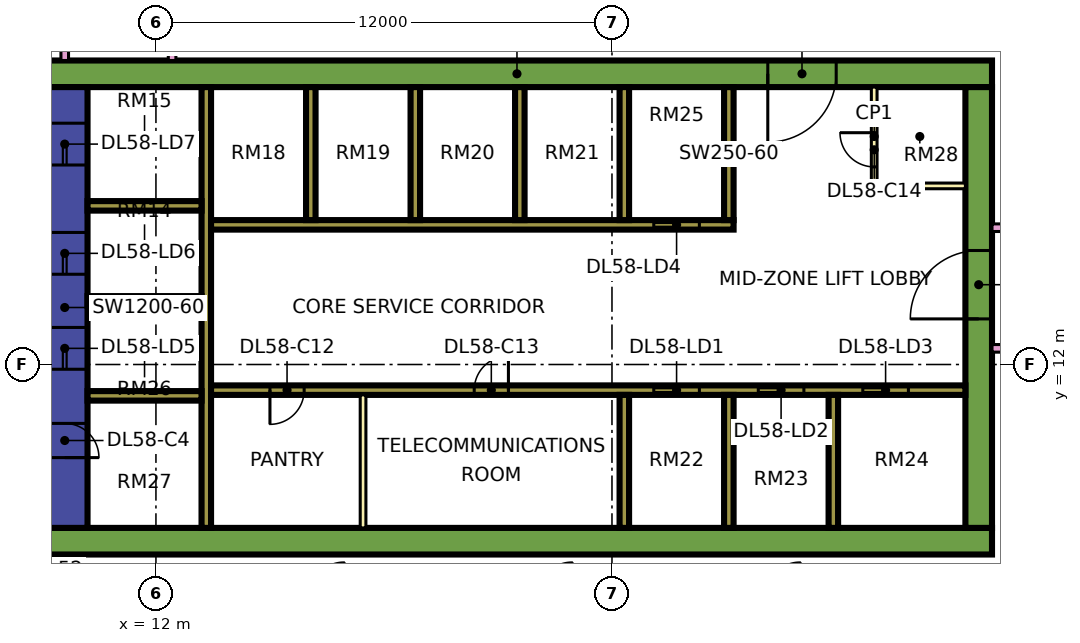
"""IFC4 building model, lengths in metres.
Left out: names, types, materials, properties, quantities, classifications, styles, units other than length and angle.
Written with IfcOpenShell. Run it as: python <this file> out.ifc"""

import sys

from ifc_helpers import new_model, si_unit, direction, frame, frame_2d, origin, place, context, subcontext, project, spatial, rectangle, extrude, element, fill, save


model = new_model("IFC4")
c1 = context("Model", 3, precision=1e-05, world=origin(), true_north=direction((0.0, 1.0)))
c2 = subcontext(c1, "Body", "Model", "MODEL_VIEW")
j1 = project(units=[si_unit("LENGTHUNIT", "METRE"), si_unit("PLANEANGLEUNIT", "RADIAN")], contexts=[c1])
p1 = place(None, origin())
s1 = spatial("IfcSite", under=j1, at=p1, CompositionType="ELEMENT")
p2 = place(p1, origin())
s2 = spatial("IfcBuilding", under=s1, at=p2, CompositionType="ELEMENT")
p3 = place(p2, frame((0.0, 0.0, 245.4)))
s3 = spatial("IfcBuildingStorey", under=s2, at=p3, CompositionType="ELEMENT", Elevation=245.4)
p4 = place(p3, frame((9.0, 7.35, 0.0), z_axis=(0.0, 0.0, 1.0), x_axis=(1.0, 0.0, 0.0)))
e1 = element("IfcWall", 1, at=p4, inside=s3, PredefinedType="SHEAR", context=c2, shape_type="SweptSolid", body=[
    extrude(rectangle(XDim=25.0, YDim=0.7, at=frame_2d((12.5, 0.0))), origin(), (0.0, 0.0, 1.0), 3.75),
])
p5 = place(p3, frame((9.0, 19.65, 0.0), z_axis=(0.0, 0.0, 1.0), x_axis=(1.0, 0.0, 0.0)))
e2 = element("IfcWall", 2, at=p5, inside=s3, PredefinedType="SHEAR", context=c2, shape_type="SweptSolid", body=[
    extrude(rectangle(XDim=25.0, YDim=0.7, at=frame_2d((12.5, 0.0))), origin(), (0.0, 0.0, 1.0), 3.75),
])
p6 = place(p5, frame((19.1, 0.0, 0.0)))
e3 = element("IfcOpeningElement", 3, at=p6, cuts=e2, PredefinedType="OPENING", context=c2, shape_type="SweptSolid", body=[
    extrude(rectangle(XDim=1.8, YDim=2.4, at=frame_2d((0.9, 1.2))), frame((0.0, 0.36, 0.0), z_axis=(0.0, -1.0, 0.0), x_axis=(1.0, 0.0, 0.0)), (0.0, 0.0, 1.0), 0.72),
])
p7 = place(p3, frame((9.6, 7.7, 0.0), z_axis=(0.0, 0.0, 1.0), x_axis=(0.0, 1.0, 0.0)))
e4 = element("IfcWall", 4, at=p7, inside=s3, PredefinedType="SHEAR", context=c2, shape_type="SweptSolid", body=[
    extrude(rectangle(XDim=11.6, YDim=1.2, at=frame_2d((5.8, 0.0))), origin(), (0.0, 0.0, 1.0), 3.75),
])
p8 = place(p7, frame((4.175, 0.0, 0.0)))
e5 = element("IfcOpeningElement", 5, at=p8, cuts=e4, PredefinedType="OPENING", context=c2, shape_type="SweptSolid", body=[
    extrude(rectangle(XDim=1.1, YDim=2.2, at=frame_2d((0.55, 1.1))), frame((0.0, 0.61, 0.0), z_axis=(0.0, -1.0, 0.0), x_axis=(1.0, 0.0, 0.0)), (0.0, 0.0, 1.0), 1.22),
])
p9 = place(p7, frame((6.675, 0.0, 0.0)))
e6 = element("IfcOpeningElement", 6, at=p9, cuts=e4, PredefinedType="OPENING", context=c2, shape_type="SweptSolid", body=[
    extrude(rectangle(XDim=1.1, YDim=2.2, at=frame_2d((0.55, 1.1))), frame((0.0, 0.61, 0.0), z_axis=(0.0, -1.0, 0.0), x_axis=(1.0, 0.0, 0.0)), (0.0, 0.0, 1.0), 1.22),
])
p10 = place(p7, frame((9.55, 0.0, 0.0)))
e7 = element("IfcOpeningElement", 7, at=p10, cuts=e4, PredefinedType="OPENING", context=c2, shape_type="SweptSolid", body=[
    extrude(rectangle(XDim=1.1, YDim=2.2, at=frame_2d((0.55, 1.1))), frame((0.0, 0.61, 0.0), z_axis=(0.0, -1.0, 0.0), x_axis=(1.0, 0.0, 0.0)), (0.0, 0.0, 1.0), 1.22),
])
p11 = place(p7, frame((1.85, 0.0, 0.0)))
e8 = element("IfcOpeningElement", 8, at=p11, cuts=e4, PredefinedType="OPENING", context=c2, shape_type="SweptSolid", body=[
    extrude(rectangle(XDim=0.9, YDim=2.1, at=frame_2d((0.45, 1.05))), frame((0.0, 0.61, 0.0), z_axis=(0.0, -1.0, 0.0), x_axis=(1.0, 0.0, 0.0)), (0.0, 0.0, 1.0), 1.22),
])
p12 = place(p3, frame((33.65, 7.7, 0.0), z_axis=(0.0, 0.0, 1.0), x_axis=(0.0, 1.0, 0.0)))
e9 = element("IfcWall", 9, at=p12, inside=s3, PredefinedType="SHEAR", context=c2, shape_type="SweptSolid", body=[
    extrude(rectangle(XDim=11.6, YDim=0.7, at=frame_2d((5.8, 0.0))), origin(), (0.0, 0.0, 1.0), 3.75),
])
p13 = place(p12, frame((5.5, 0.0, 0.0)))
e10 = element("IfcOpeningElement", 10, at=p13, cuts=e9, PredefinedType="OPENING", context=c2, shape_type="SweptSolid", body=[
    extrude(rectangle(XDim=1.8, YDim=2.4, at=frame_2d((0.9, 1.2))), frame((0.0, 0.36, 0.0), z_axis=(0.0, -1.0, 0.0), x_axis=(1.0, 0.0, 0.0)), (0.0, 0.0, 1.0), 0.72),
])
p14 = place(p3, frame((13.325, 7.7, 0.0), z_axis=(0.0, 0.0, 1.0), x_axis=(0.0, 1.0, 0.0)))
e11 = element("IfcWall", 11, at=p14, inside=s3, PredefinedType="SHEAR", context=c2, shape_type="SweptSolid", body=[
    extrude(rectangle(XDim=11.6, YDim=0.25, at=frame_2d((5.8, 0.0))), origin(), (0.0, 0.0, 1.0), 3.75),
])
p15 = place(p3, frame((13.45, 11.325, 0.0), z_axis=(0.0, 0.0, 1.0), x_axis=(1.0, 0.0, 0.0)))
e12 = element("IfcWall", 12, at=p15, inside=s3, PredefinedType="SHEAR", context=c2, shape_type="SweptSolid", body=[
    extrude(rectangle(XDim=19.85, YDim=0.25, at=frame_2d((9.925, 0.0))), origin(), (0.0, 0.0, 1.0), 3.75),
])
p16 = place(p15, frame((11.65, 0.0, 0.0)))
e13 = element("IfcOpeningElement", 13, at=p16, cuts=e12, PredefinedType="OPENING", context=c2, shape_type="SweptSolid", body=[
    extrude(rectangle(XDim=1.2, YDim=2.2, at=frame_2d((0.6, 1.1))), frame((0.0, 0.135, 0.0), z_axis=(0.0, -1.0, 0.0), x_axis=(1.0, 0.0, 0.0)), (0.0, 0.0, 1.0), 0.27),
])
p17 = place(p15, frame((14.4, 0.0, 0.0)))
e14 = element("IfcOpeningElement", 14, at=p17, cuts=e12, PredefinedType="OPENING", context=c2, shape_type="SweptSolid", body=[
    extrude(rectangle(XDim=1.2, YDim=2.2, at=frame_2d((0.6, 1.1))), frame((0.0, 0.135, 0.0), z_axis=(0.0, -1.0, 0.0), x_axis=(1.0, 0.0, 0.0)), (0.0, 0.0, 1.0), 0.27),
])
p18 = place(p15, frame((17.15, 0.0, 0.0)))
e15 = element("IfcOpeningElement", 15, at=p18, cuts=e12, PredefinedType="OPENING", context=c2, shape_type="SweptSolid", body=[
    extrude(rectangle(XDim=1.2, YDim=2.2, at=frame_2d((0.6, 1.1))), frame((0.0, 0.135, 0.0), z_axis=(0.0, -1.0, 0.0), x_axis=(1.0, 0.0, 0.0)), (0.0, 0.0, 1.0), 0.27),
])
p19 = place(p15, frame((1.55, 0.0, 0.0)))
e16 = element("IfcOpeningElement", 16, at=p19, cuts=e12, PredefinedType="OPENING", context=c2, shape_type="SweptSolid", body=[
    extrude(rectangle(XDim=0.9, YDim=2.1, at=frame_2d((0.45, 1.05))), frame((0.0, 0.135, 0.0), z_axis=(0.0, -1.0, 0.0), x_axis=(1.0, 0.0, 0.0)), (0.0, 0.0, 1.0), 0.27),
])
p20 = place(p15, frame((6.925, 0.0, 0.0)))
e17 = element("IfcOpeningElement", 17, at=p20, cuts=e12, PredefinedType="OPENING", context=c2, shape_type="SweptSolid", body=[
    extrude(rectangle(XDim=0.9, YDim=2.1, at=frame_2d((0.45, 1.05))), frame((0.0, 0.135, 0.0), z_axis=(0.0, -1.0, 0.0), x_axis=(1.0, 0.0, 0.0)), (0.0, 0.0, 1.0), 0.27),
])
p21 = place(p3, frame((13.45, 15.675, 0.0), z_axis=(0.0, 0.0, 1.0), x_axis=(1.0, 0.0, 0.0)))
e18 = element("IfcWall", 18, at=p21, inside=s3, PredefinedType="SHEAR", context=c2, shape_type="SweptSolid", body=[
    extrude(rectangle(XDim=13.75, YDim=0.25, at=frame_2d((6.875, 0.0))), origin(), (0.0, 0.0, 1.0), 3.75),
])
p22 = place(p21, frame((11.65, 0.0, 0.0)))
e19 = element("IfcOpeningElement", 19, at=p22, cuts=e18, PredefinedType="OPENING", context=c2, shape_type="SweptSolid", body=[
    extrude(rectangle(XDim=1.2, YDim=2.2, at=frame_2d((0.6, 1.1))), frame((0.0, 0.135, 0.0), z_axis=(0.0, -1.0, 0.0), x_axis=(1.0, 0.0, 0.0)), (0.0, 0.0, 1.0), 0.27),
])
for number, where, z_axis, x_axis in (
    (20, (10.2, 11.175, 0.0), (0.0, 0.0, 1.0), (1.0, 0.0, 0.0)),
    (21, (10.2, 13.675, 0.0), (0.0, 0.0, 1.0), (1.0, 0.0, 0.0)),
    (22, (10.2, 16.175, 0.0), (0.0, 0.0, 1.0), (1.0, 0.0, 0.0)),
):
    element("IfcWall", number, at=place(p3, frame(where, z_axis=z_axis, x_axis=x_axis)), inside=s3, PredefinedType="SHEAR", context=c2, shape_type="SweptSolid", body=[
        extrude(rectangle(XDim=3.0, YDim=0.25, at=frame_2d((1.5, 0.0))), origin(), (0.0, 0.0, 1.0), 3.75),
    ])
for number, where, z_axis, x_axis in (
    (23, (24.325, 7.7, 0.0), (0.0, 0.0, 1.0), (0.0, 1.0, 0.0)),
    (24, (27.075, 7.7, 0.0), (0.0, 0.0, 1.0), (0.0, 1.0, 0.0)),
    (25, (29.825, 7.7, 0.0), (0.0, 0.0, 1.0), (0.0, 1.0, 0.0)),
    (26, (16.075, 15.8, 0.0), (0.0, 0.0, 1.0), (0.0, 1.0, 0.0)),
    (27, (18.825, 15.8, 0.0), (0.0, 0.0, 1.0), (0.0, 1.0, 0.0)),
    (28, (21.575, 15.8, 0.0), (0.0, 0.0, 1.0), (0.0, 1.0, 0.0)),
    (29, (24.325, 15.8, 0.0), (0.0, 0.0, 1.0), (0.0, 1.0, 0.0)),
    (30, (27.075, 15.8, 0.0), (0.0, 0.0, 1.0), (0.0, 1.0, 0.0)),
):
    element("IfcWall", number, at=place(p3, frame(where, z_axis=z_axis, x_axis=x_axis)), inside=s3, PredefinedType="SHEAR", context=c2, shape_type="SweptSolid", body=[
        extrude(rectangle(XDim=3.5, YDim=0.25, at=frame_2d((1.75, 0.0))), origin(), (0.0, 0.0, 1.0), 3.75),
    ])
p23 = place(p3, frame((-1.447, 12.553, 0.0), z_axis=(0.0, 0.0, 1.0), x_axis=(0.707106781187, -0.707106781187, 0.0)))
e31 = element("IfcWall", 31, at=p23, inside=s3, PredefinedType="SOLIDWALL", context=c2, shape_type="SweptSolid", body=[
    extrude(rectangle(XDim=19.799, YDim=0.15, at=frame_2d((9.899, 0.0))), origin(), (0.0, 0.0, 1.0), 3.35),
])
p24 = place(p23, frame((2.212, 0.0, 0.45)))
e32 = element("IfcOpeningElement", 32, at=p24, cuts=e31, PredefinedType="OPENING", context=c2, shape_type="SweptSolid", body=[
    extrude(rectangle(XDim=3.0, YDim=2.4, at=frame_2d((1.5, 1.2))), frame((0.0, 0.085, 0.0), z_axis=(0.0, -1.0, 0.0), x_axis=(1.0, 0.0, 0.0)), (0.0, 0.0, 1.0), 0.17),
])
p25 = place(p23, frame((10.216, 0.0, 0.45)))
e33 = element("IfcOpeningElement", 33, at=p25, cuts=e31, PredefinedType="OPENING", context=c2, shape_type="SweptSolid", body=[
    extrude(rectangle(XDim=3.0, YDim=2.4, at=frame_2d((1.5, 1.2))), frame((0.0, 0.085, 0.0), z_axis=(0.0, -1.0, 0.0), x_axis=(1.0, 0.0, 0.0)), (0.0, 0.0, 1.0), 0.17),
])
p26 = place(p3, frame((17.45, 7.7, 0.0), z_axis=(0.0, 0.0, 1.0), x_axis=(0.0, 1.0, 0.0)))
e34 = element("IfcWall", 34, at=p26, inside=s3, PredefinedType="PARTITIONING", context=c2, shape_type="SweptSolid", body=[
    extrude(rectangle(XDim=3.5, YDim=0.15, at=frame_2d((1.75, 0.0))), origin(), (0.0, 0.0, 1.0), 3.35),
])
p27 = place(p3, frame((30.9, 16.7, 0.0), z_axis=(0.0, 0.0, 1.0), x_axis=(0.0, 1.0, 0.0)))
e35 = element("IfcWall", 35, at=p27, inside=s3, PredefinedType="PARTITIONING", context=c2, shape_type="SweptSolid", body=[
    extrude(rectangle(XDim=2.6, YDim=0.15, at=frame_2d((1.3, 0.0))), origin(), (0.0, 0.0, 1.0), 3.35),
])
p28 = place(p27, frame((0.5, 0.0, 0.0)))
e36 = element("IfcOpeningElement", 36, at=p28, cuts=e35, PredefinedType="OPENING", context=c2, shape_type="SweptSolid", body=[
    extrude(rectangle(XDim=0.9, YDim=2.1, at=frame_2d((0.45, 1.05))), frame((0.0, 0.085, 0.0), z_axis=(0.0, -1.0, 0.0), x_axis=(1.0, 0.0, 0.0)), (0.0, 0.0, 1.0), 0.17),
])
p29 = place(p3, frame((30.9, 16.7, 0.0), z_axis=(0.0, 0.0, 1.0), x_axis=(1.0, 0.0, 0.0)))
e37 = element("IfcWall", 37, at=p29, inside=s3, PredefinedType="PARTITIONING", context=c2, shape_type="SweptSolid", body=[
    extrude(rectangle(XDim=2.4, YDim=0.15, at=frame_2d((1.2, 0.0))), origin(), (0.0, 0.0, 1.0), 3.35),
])
p30 = place(p3, frame((9.6, 20.0, 0.0), z_axis=(0.0, 0.0, 1.0), x_axis=(0.0, 1.0, 0.0)))
e38 = element("IfcWall", 38, at=p30, inside=s3, PredefinedType="PARTITIONING", context=c2, shape_type="SweptSolid", body=[
    extrude(rectangle(XDim=44.35, YDim=0.2, at=frame_2d((22.175, 0.0))), origin(), (0.0, 0.0, 1.0), 3.35),
])
p31 = place(p30, frame((28.8, 0.0, 0.0)))
e39 = element("IfcOpeningElement", 39, at=p31, cuts=e38, PredefinedType="OPENING", context=c2, shape_type="SweptSolid", body=[
    extrude(rectangle(XDim=1.0, YDim=2.1, at=frame_2d((0.5, 1.05))), frame((0.0, 0.11, 0.0), z_axis=(0.0, -1.0, 0.0), x_axis=(1.0, 0.0, 0.0)), (0.0, 0.0, 1.0), 0.22),
])
p32 = place(p30, frame((0.6, 0.0, 0.0)))
e40 = element("IfcOpeningElement", 40, at=p32, cuts=e38, PredefinedType="OPENING", context=c2, shape_type="SweptSolid", body=[
    extrude(rectangle(XDim=1.2, YDim=2.1, at=frame_2d((0.6, 1.05))), frame((0.0, 0.11, 0.0), z_axis=(0.0, -1.0, 0.0), x_axis=(1.0, 0.0, 0.0)), (0.0, 0.0, 1.0), 0.22),
])
p33 = place(p30, frame((3.9, 0.0, 0.0)))
e41 = element("IfcOpeningElement", 41, at=p33, cuts=e38, PredefinedType="OPENING", context=c2, shape_type="SweptSolid", body=[
    extrude(rectangle(XDim=1.0, YDim=2.1, at=frame_2d((0.5, 1.05))), frame((0.0, 0.11, 0.0), z_axis=(0.0, -1.0, 0.0), x_axis=(1.0, 0.0, 0.0)), (0.0, 0.0, 1.0), 0.22),
])
p34 = place(p3, frame((12.425, 20.0, 0.0), z_axis=(0.0, 0.0, 1.0), x_axis=(0.0, 1.0, 0.0)))
e42 = element("IfcWall", 42, at=p34, inside=s3, PredefinedType="PARTITIONING", context=c2, shape_type="SweptSolid", body=[
    extrude(rectangle(XDim=42.926, YDim=0.2, at=frame_2d((21.463, 0.0))), origin(), (0.0, 0.0, 1.0), 3.35),
])
p35 = place(p34, frame((7.0, 0.0, 0.0)))
e43 = element("IfcOpeningElement", 43, at=p35, cuts=e42, PredefinedType="OPENING", context=c2, shape_type="SweptSolid", body=[
    extrude(rectangle(XDim=1.0, YDim=2.1, at=frame_2d((0.5, 1.05))), frame((0.0, 0.11, 0.0), z_axis=(0.0, -1.0, 0.0), x_axis=(1.0, 0.0, 0.0)), (0.0, 0.0, 1.0), 0.22),
])
p36 = place(p34, frame((12.95, 0.0, 0.0)))
e44 = element("IfcOpeningElement", 44, at=p36, cuts=e42, PredefinedType="OPENING", context=c2, shape_type="SweptSolid", body=[
    extrude(rectangle(XDim=1.0, YDim=2.1, at=frame_2d((0.5, 1.05))), frame((0.0, 0.11, 0.0), z_axis=(0.0, -1.0, 0.0), x_axis=(1.0, 0.0, 0.0)), (0.0, 0.0, 1.0), 0.22),
])
p37 = place(p34, frame((16.75, 0.0, 0.0)))
e45 = element("IfcOpeningElement", 45, at=p37, cuts=e42, PredefinedType="OPENING", context=c2, shape_type="SweptSolid", body=[
    extrude(rectangle(XDim=1.0, YDim=2.1, at=frame_2d((0.5, 1.05))), frame((0.0, 0.11, 0.0), z_axis=(0.0, -1.0, 0.0), x_axis=(1.0, 0.0, 0.0)), (0.0, 0.0, 1.0), 0.22),
])
p38 = place(p34, frame((34.9, 0.0, 0.0)))
e46 = element("IfcOpeningElement", 46, at=p38, cuts=e42, PredefinedType="OPENING", context=c2, shape_type="SweptSolid", body=[
    extrude(rectangle(XDim=1.0, YDim=2.1, at=frame_2d((0.5, 1.05))), frame((0.0, 0.11, 0.0), z_axis=(0.0, -1.0, 0.0), x_axis=(1.0, 0.0, 0.0)), (0.0, 0.0, 1.0), 0.22),
])
p39 = place(p34, frame((1.15, 0.0, 0.0)))
e47 = element("IfcOpeningElement", 47, at=p39, cuts=e42, PredefinedType="OPENING", context=c2, shape_type="SweptSolid", body=[
    extrude(rectangle(XDim=1.8, YDim=2.1, at=frame_2d((0.9, 1.05))), frame((0.0, 0.11, 0.0), z_axis=(0.0, -1.0, 0.0), x_axis=(1.0, 0.0, 0.0)), (0.0, 0.0, 1.0), 0.22),
])
p40 = place(p34, frame((28.6, 0.0, 0.0)))
e48 = element("IfcOpeningElement", 48, at=p40, cuts=e42, PredefinedType="OPENING", context=c2, shape_type="SweptSolid", body=[
    extrude(rectangle(XDim=1.8, YDim=2.1, at=frame_2d((0.9, 1.05))), frame((0.0, 0.11, 0.0), z_axis=(0.0, -1.0, 0.0), x_axis=(1.0, 0.0, 0.0)), (0.0, 0.0, 1.0), 0.22),
])
p41 = place(p3, frame((34.0, 12.425, 0.0), z_axis=(0.0, 0.0, 1.0), x_axis=(1.0, 0.0, 0.0)))
e49 = element("IfcWall", 49, at=p41, inside=s3, PredefinedType="PARTITIONING", context=c2, shape_type="SweptSolid", body=[
    extrude(rectangle(XDim=2.426, YDim=0.2, at=frame_2d((1.213, 0.0))), origin(), (0.0, 0.0, 1.0), 3.35),
])
p42 = place(p3, frame((34.0, 15.6, 0.0), z_axis=(0.0, 0.0, 1.0), x_axis=(1.0, 0.0, 0.0)))
e50 = element("IfcWall", 50, at=p42, inside=s3, PredefinedType="PARTITIONING", context=c2, shape_type="SweptSolid", body=[
    extrude(rectangle(XDim=10.35, YDim=0.2, at=frame_2d((5.175, 0.0))), origin(), (0.0, 0.0, 1.0), 3.35),
])
p43 = place(p42, frame((5.6, 0.0, 0.0)))
e51 = element("IfcOpeningElement", 51, at=p43, cuts=e50, PredefinedType="OPENING", context=c2, shape_type="SweptSolid", body=[
    extrude(rectangle(XDim=1.0, YDim=2.1, at=frame_2d((0.5, 1.05))), frame((0.0, 0.11, 0.0), z_axis=(0.0, -1.0, 0.0), x_axis=(1.0, 0.0, 0.0)), (0.0, 0.0, 1.0), 0.22),
])
p44 = place(p42, frame((0.45, 0.0, 0.0)))
e52 = element("IfcOpeningElement", 52, at=p44, cuts=e50, PredefinedType="OPENING", context=c2, shape_type="SweptSolid", body=[
    extrude(rectangle(XDim=1.2, YDim=2.1, at=frame_2d((0.6, 1.05))), frame((0.0, 0.11, 0.0), z_axis=(0.0, -1.0, 0.0), x_axis=(1.0, 0.0, 0.0)), (0.0, 0.0, 1.0), 0.22),
])
p45 = place(p16, origin())
e53 = element("IfcDoor", 53, at=p45, inside=s3, OperationType="DOUBLE_DOOR_SLIDING", PredefinedType="DOOR", context=c2, shape_type="SweptSolid", body=[
    extrude(rectangle(XDim=1.2, YDim=2.2, at=frame_2d((0.6, 1.1))), frame((0.0, 0.025, 0.0), z_axis=(0.0, -1.0, 0.0), x_axis=(1.0, 0.0, 0.0)), (0.0, 0.0, 1.0), 0.05),
])
fill(e13, e53)
p46 = place(p17, origin())
e54 = element("IfcDoor", 54, at=p46, inside=s3, OperationType="DOUBLE_DOOR_SLIDING", PredefinedType="DOOR", context=c2, shape_type="SweptSolid", body=[
    extrude(rectangle(XDim=1.2, YDim=2.2, at=frame_2d((0.6, 1.1))), frame((0.0, 0.025, 0.0), z_axis=(0.0, -1.0, 0.0), x_axis=(1.0, 0.0, 0.0)), (0.0, 0.0, 1.0), 0.05),
])
fill(e14, e54)
p47 = place(p18, origin())
e55 = element("IfcDoor", 55, at=p47, inside=s3, OperationType="DOUBLE_DOOR_SLIDING", PredefinedType="DOOR", context=c2, shape_type="SweptSolid", body=[
    extrude(rectangle(XDim=1.2, YDim=2.2, at=frame_2d((0.6, 1.1))), frame((0.0, 0.025, 0.0), z_axis=(0.0, -1.0, 0.0), x_axis=(1.0, 0.0, 0.0)), (0.0, 0.0, 1.0), 0.05),
])
fill(e15, e55)
p48 = place(p22, origin())
e56 = element("IfcDoor", 56, at=p48, inside=s3, OperationType="DOUBLE_DOOR_SLIDING", PredefinedType="DOOR", context=c2, shape_type="SweptSolid", body=[
    extrude(rectangle(XDim=1.2, YDim=2.2, at=frame_2d((0.6, 1.1))), frame((0.0, 0.025, 0.0), z_axis=(0.0, -1.0, 0.0), x_axis=(1.0, 0.0, 0.0)), (0.0, 0.0, 1.0), 0.05),
])
fill(e19, e56)
p49 = place(p8, origin())
e57 = element("IfcDoor", 57, at=p49, inside=s3, OperationType="DOUBLE_DOOR_SLIDING", PredefinedType="DOOR", context=c2, shape_type="SweptSolid", body=[
    extrude(rectangle(XDim=1.1, YDim=2.2, at=frame_2d((0.55, 1.1))), frame((0.0, 0.025, 0.0), z_axis=(0.0, -1.0, 0.0), x_axis=(1.0, 0.0, 0.0)), (0.0, 0.0, 1.0), 0.05),
])
fill(e5, e57)
p50 = place(p9, origin())
e58 = element("IfcDoor", 58, at=p50, inside=s3, OperationType="DOUBLE_DOOR_SLIDING", PredefinedType="DOOR", context=c2, shape_type="SweptSolid", body=[
    extrude(rectangle(XDim=1.1, YDim=2.2, at=frame_2d((0.55, 1.1))), frame((0.0, 0.025, 0.0), z_axis=(0.0, -1.0, 0.0), x_axis=(1.0, 0.0, 0.0)), (0.0, 0.0, 1.0), 0.05),
])
fill(e6, e58)
p51 = place(p10, origin())
e59 = element("IfcDoor", 59, at=p51, inside=s3, OperationType="DOUBLE_DOOR_SLIDING", PredefinedType="DOOR", context=c2, shape_type="SweptSolid", body=[
    extrude(rectangle(XDim=1.1, YDim=2.2, at=frame_2d((0.55, 1.1))), frame((0.0, 0.025, 0.0), z_axis=(0.0, -1.0, 0.0), x_axis=(1.0, 0.0, 0.0)), (0.0, 0.0, 1.0), 0.05),
])
fill(e7, e59)
p52 = place(p13, origin())
e60 = element("IfcDoor", 60, at=p52, inside=s3, OperationType="DOUBLE_DOOR_SINGLE_SWING", PredefinedType="DOOR", context=c2, shape_type="SweptSolid", body=[
    extrude(rectangle(XDim=1.8, YDim=2.4, at=frame_2d((0.9, 1.2))), frame((0.0, 0.025, 0.0), z_axis=(0.0, -1.0, 0.0), x_axis=(1.0, 0.0, 0.0)), (0.0, 0.0, 1.0), 0.05),
])
fill(e10, e60)
p53 = place(p6, frame((1.8, 0.0, 0.0), z_axis=(0.0, 0.0, 1.0), x_axis=(-1.0, 0.0, 0.0)))
e61 = element("IfcDoor", 61, at=p53, inside=s3, OperationType="DOUBLE_DOOR_SINGLE_SWING", PredefinedType="DOOR", context=c2, shape_type="SweptSolid", body=[
    extrude(rectangle(XDim=1.8, YDim=2.4, at=frame_2d((0.9, 1.2))), frame((0.0, 0.025, 0.0), z_axis=(0.0, -1.0, 0.0), x_axis=(1.0, 0.0, 0.0)), (0.0, 0.0, 1.0), 0.05),
])
fill(e3, e61)
p54 = place(p11, frame((0.9, 0.0, 0.0), z_axis=(0.0, 0.0, 1.0), x_axis=(-1.0, 0.0, 0.0)))
e62 = element("IfcDoor", 62, at=p54, inside=s3, OperationType="SINGLE_SWING_LEFT", PredefinedType="DOOR", context=c2, shape_type="SweptSolid", body=[
    extrude(rectangle(XDim=0.9, YDim=2.1, at=frame_2d((0.45, 1.05))), frame((0.0, 0.025, 0.0), z_axis=(0.0, -1.0, 0.0), x_axis=(1.0, 0.0, 0.0)), (0.0, 0.0, 1.0), 0.05),
])
fill(e8, e62)
p55 = place(p19, frame((0.9, 0.0, 0.0), z_axis=(0.0, 0.0, 1.0), x_axis=(-1.0, 0.0, 0.0)))
e63 = element("IfcDoor", 63, at=p55, inside=s3, OperationType="SINGLE_SWING_LEFT", PredefinedType="DOOR", context=c2, shape_type="SweptSolid", body=[
    extrude(rectangle(XDim=0.9, YDim=2.1, at=frame_2d((0.45, 1.05))), frame((0.0, 0.025, 0.0), z_axis=(0.0, -1.0, 0.0), x_axis=(1.0, 0.0, 0.0)), (0.0, 0.0, 1.0), 0.05),
])
fill(e16, e63)
p56 = place(p20, frame((0.9, 0.0, 0.0), z_axis=(0.0, 0.0, 1.0), x_axis=(-1.0, 0.0, 0.0)))
e64 = element("IfcDoor", 64, at=p56, inside=s3, OperationType="SINGLE_SWING_RIGHT", PredefinedType="DOOR", context=c2, shape_type="SweptSolid", body=[
    extrude(rectangle(XDim=0.9, YDim=2.1, at=frame_2d((0.45, 1.05))), frame((0.0, 0.025, 0.0), z_axis=(0.0, -1.0, 0.0), x_axis=(1.0, 0.0, 0.0)), (0.0, 0.0, 1.0), 0.05),
])
fill(e17, e64)
p57 = place(p28, frame((0.9, 0.0, 0.0), z_axis=(0.0, 0.0, 1.0), x_axis=(-1.0, 0.0, 0.0)))
e65 = element("IfcDoor", 65, at=p57, inside=s3, OperationType="SINGLE_SWING_RIGHT", PredefinedType="DOOR", context=c2, shape_type="SweptSolid", body=[
    extrude(rectangle(XDim=0.9, YDim=2.1, at=frame_2d((0.45, 1.05))), frame((0.0, 0.025, 0.0), z_axis=(0.0, -1.0, 0.0), x_axis=(1.0, 0.0, 0.0)), (0.0, 0.0, 1.0), 0.05),
])
fill(e36, e65)
save(model, sys.argv[1])
